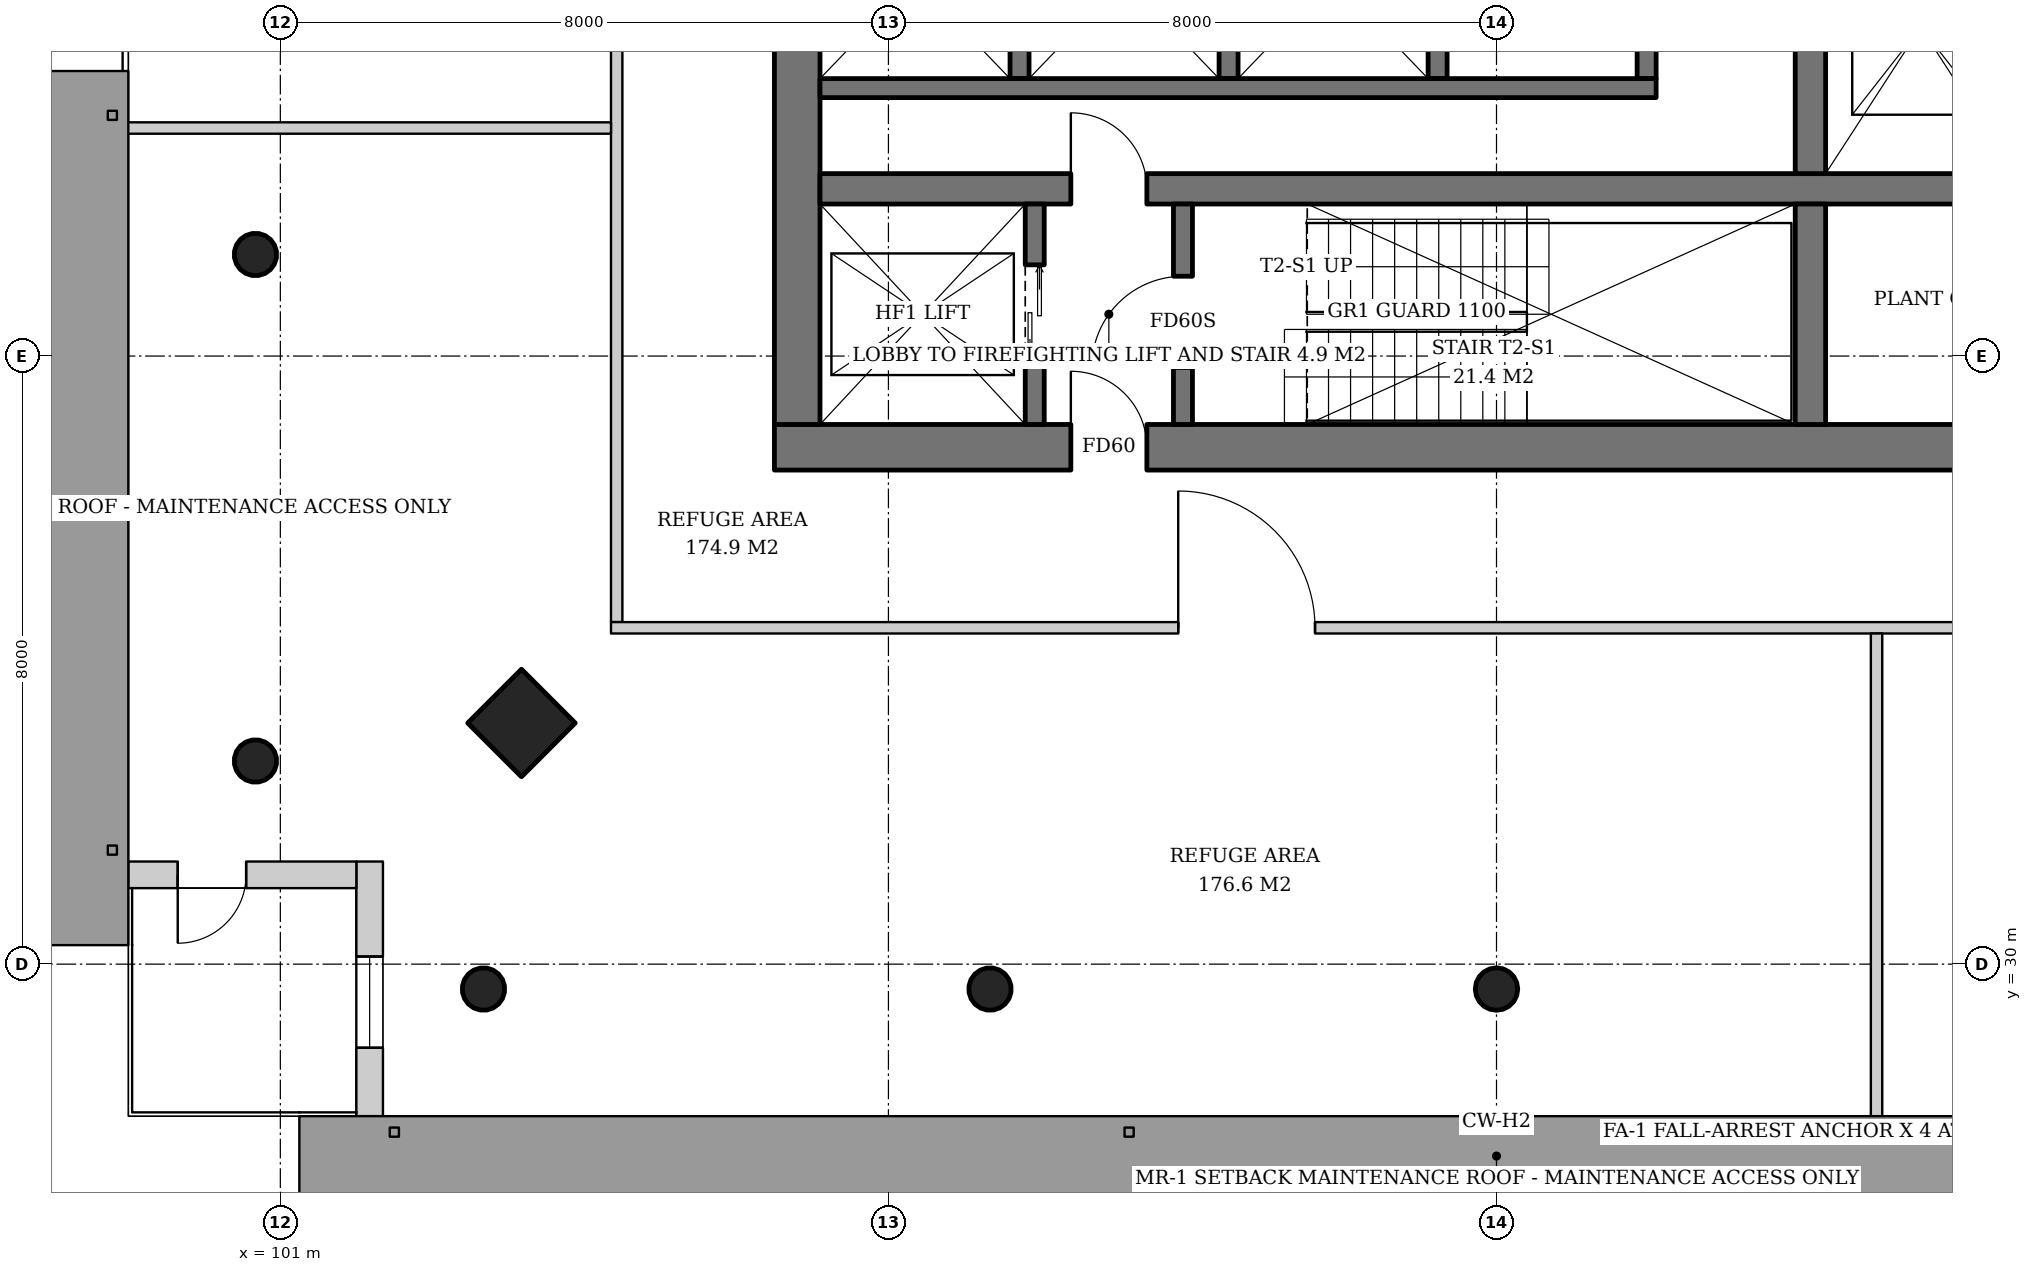
"""IFC4 building model, lengths in metres.
Left out: names, types, materials, properties, quantities, classifications, styles, units other than length and angle.
Written with IfcOpenShell. Run it as: python <this file> out.ifc"""

import sys

from ifc_helpers import new_model, si_unit, direction, frame, frame_2d, origin, origin_2d, place, context, subcontext, project, spatial, rectangle, hollow_circle, extrude, element, fill, save


model = new_model("IFC4")
c1 = context("Model", 3, precision=1e-05, world=origin(), true_north=direction((0.0, 1.0)))
c2 = subcontext(c1, "Body", "Model", "MODEL_VIEW")
j1 = project(units=[si_unit("LENGTHUNIT", "METRE"), si_unit("PLANEANGLEUNIT", "RADIAN")], contexts=[c1])
p1 = place(None, origin())
s1 = spatial("IfcSite", under=j1, at=p1, CompositionType="ELEMENT")
p2 = place(p1, origin())
s2 = spatial("IfcBuilding", under=s1, at=p2, CompositionType="ELEMENT")
p3 = place(p2, frame((0.0, 0.0, 81.8)))
s3 = spatial("IfcBuildingStorey", under=s2, at=p3, CompositionType="ELEMENT", Elevation=81.8)
p4 = place(p3, frame((104.121, 33.121, 0.0), z_axis=(0.043029647111, 0.043029647111, 0.998146732169), x_axis=(-0.707106781187, 0.707106781187, 0.0)))
e1 = element("IfcColumn", 1, at=p4, inside=s3, PredefinedType="COLUMN", context=c2, shape_type="SweptSolid", body=[
    extrude(rectangle(XDim=1.0, YDim=1.0, at=origin_2d()), origin(), (0.0, 0.0, 1.0), 3.807),
])
p5 = place(p3, frame((100.621, 32.621, 0.0), z_axis=(0.043029647111, 0.043029647111, 0.998146732169), x_axis=(-0.707106781187, 0.707106781187, 0.0)))
e2 = element("IfcColumn", 2, at=p5, inside=s3, PredefinedType="COLUMN", context=c2, shape_type="SweptSolid", body=[
    extrude(hollow_circle(Radius=0.28, WallThickness=0.02, at=origin_2d()), origin(), (0.0, 0.0, 1.0), 3.807),
])
p6 = place(p3, frame((100.621, 39.31, 0.0), z_axis=(0.043059525333, 0.021561848751, 0.998839808957), x_axis=(-0.44774654769, 0.894160516368, 0.0)))
e3 = element("IfcColumn", 3, at=p6, inside=s3, PredefinedType="COLUMN", context=c2, shape_type="SweptSolid", body=[
    extrude(hollow_circle(Radius=0.28, WallThickness=0.02, at=origin_2d()), origin(), (0.0, 0.0, 1.0), 3.804),
])
p7 = place(p3, frame((103.621, 29.621, 0.0), z_axis=(0.043029647111, 0.043029647111, 0.998146732169), x_axis=(-0.707106781187, 0.707106781187, 0.0)))
e4 = element("IfcColumn", 4, at=p7, inside=s3, PredefinedType="COLUMN", context=c2, shape_type="SweptSolid", body=[
    extrude(hollow_circle(Radius=0.28, WallThickness=0.02, at=origin_2d()), origin(), (0.0, 0.0, 1.0), 3.807),
])
p8 = place(p3, frame((110.31, 29.621, 0.0), z_axis=(0.021561848751, 0.043059525333, 0.998839808957), x_axis=(-0.894160516368, 0.44774654769, 0.0)))
e5 = element("IfcColumn", 5, at=p8, inside=s3, PredefinedType="COLUMN", context=c2, shape_type="SweptSolid", body=[
    extrude(hollow_circle(Radius=0.28, WallThickness=0.02, at=origin_2d()), origin(), (0.0, 0.0, 1.0), 3.804),
])
p9 = place(p3, frame((117.0, 29.621, 0.0), z_axis=(0.0, 0.043069538298, 0.999072076915), x_axis=(-1.0, 0.0, 0.0)))
e6 = element("IfcColumn", 6, at=p9, inside=s3, PredefinedType="COLUMN", context=c2, shape_type="SweptSolid", body=[
    extrude(hollow_circle(Radius=0.28, WallThickness=0.02, at=origin_2d()), origin(), (0.0, 0.0, 1.0), 3.803),
])
p10 = place(p3, frame((107.5, 36.8, 0.0), z_axis=(0.0, 0.0, 1.0), x_axis=(1.0, 0.0, 0.0)))
e7 = element("IfcWall", 7, at=p10, inside=s3, PredefinedType="SHEAR", context=c2, shape_type="SweptSolid", body=[
    extrude(rectangle(XDim=19.0, YDim=0.6, at=frame_2d((9.5, 0.0))), origin(), (0.0, 0.0, 1.0), 3.8),
])
p11 = place(p10, frame((3.9, 0.0, 0.0)))
e8 = element("IfcOpeningElement", 8, at=p11, cuts=e7, PredefinedType="OPENING", context=c2, shape_type="SweptSolid", body=[
    extrude(rectangle(XDim=1.0, YDim=2.1, at=frame_2d((0.5, 1.05))), frame((0.0, 0.31, 0.0), z_axis=(0.0, -1.0, 0.0), x_axis=(1.0, 0.0, 0.0)), (0.0, 0.0, 1.0), 0.62),
])
p12 = place(p10, frame((15.615, 0.0, 0.0)))
e9 = element("IfcOpeningElement", 9, at=p12, cuts=e7, PredefinedType="OPENING", context=c2, shape_type="SweptSolid", body=[
    extrude(rectangle(XDim=1.0, YDim=2.1, at=frame_2d((0.5, 1.05))), frame((0.0, 0.31, 0.0), z_axis=(0.0, -1.0, 0.0), x_axis=(1.0, 0.0, 0.0)), (0.0, 0.0, 1.0), 0.62),
])
p13 = place(p3, frame((107.8, 37.1, 0.0), z_axis=(0.0, 0.0, 1.0), x_axis=(0.0, 1.0, 0.0)))
e10 = element("IfcWall", 10, at=p13, inside=s3, PredefinedType="SHEAR", context=c2, shape_type="SweptSolid", body=[
    extrude(rectangle(XDim=17.8, YDim=0.6, at=frame_2d((8.9, 0.0))), origin(), (0.0, 0.0, 1.0), 3.8),
])
p14 = place(p13, frame((8.0, 0.0, 0.0)))
e11 = element("IfcOpeningElement", 11, at=p14, cuts=e10, PredefinedType="OPENING", context=c2, shape_type="SweptSolid", body=[
    extrude(rectangle(XDim=1.8, YDim=2.4, at=frame_2d((0.9, 1.2))), frame((0.0, 0.31, 0.0), z_axis=(0.0, -1.0, 0.0), x_axis=(1.0, 0.0, 0.0)), (0.0, 0.0, 1.0), 0.62),
])
p15 = place(p3, frame((108.1, 40.2, 0.0), z_axis=(0.0, 0.0, 1.0), x_axis=(1.0, 0.0, 0.0)))
e12 = element("IfcWall", 12, at=p15, inside=s3, PredefinedType="SHEAR", context=c2, shape_type="SweptSolid", body=[
    extrude(rectangle(XDim=17.8, YDim=0.4, at=frame_2d((8.9, 0.0))), origin(), (0.0, 0.0, 1.0), 3.8),
])
p16 = place(p15, frame((3.3, 0.0, 0.0)))
e13 = element("IfcOpeningElement", 13, at=p16, cuts=e12, PredefinedType="OPENING", context=c2, shape_type="SweptSolid", body=[
    extrude(rectangle(XDim=1.0, YDim=2.1, at=frame_2d((0.5, 1.05))), frame((0.0, 0.21, 0.0), z_axis=(0.0, -1.0, 0.0), x_axis=(1.0, 0.0, 0.0)), (0.0, 0.0, 1.0), 0.42),
])
p17 = place(p3, frame((121.13, 37.1, 0.0), z_axis=(0.0, 0.0, 1.0), x_axis=(0.0, 1.0, 0.0)))
e14 = element("IfcWall", 14, at=p17, inside=s3, PredefinedType="SHEAR", context=c2, shape_type="SweptSolid", body=[
    extrude(rectangle(XDim=2.9, YDim=0.4, at=frame_2d((1.45, 0.0))), origin(), (0.0, 0.0, 1.0), 3.8),
])
p18 = place(p3, frame((121.13, 40.4, 0.0), z_axis=(0.0, 0.0, 1.0), x_axis=(0.0, 1.0, 0.0)))
e15 = element("IfcWall", 15, at=p18, inside=s3, PredefinedType="SHEAR", context=c2, shape_type="SweptSolid", body=[
    extrude(rectangle(XDim=11.2, YDim=0.4, at=frame_2d((5.6, 0.0))), origin(), (0.0, 0.0, 1.0), 3.8),
])
p19 = place(p18, frame((5.1, 0.0, 0.0)))
e16 = element("IfcOpeningElement", 16, at=p19, cuts=e15, PredefinedType="OPENING", context=c2, shape_type="SweptSolid", body=[
    extrude(rectangle(XDim=1.0, YDim=2.1, at=frame_2d((0.5, 1.05))), frame((0.0, 0.21, 0.0), z_axis=(0.0, -1.0, 0.0), x_axis=(1.0, 0.0, 0.0)), (0.0, 0.0, 1.0), 0.42),
])
p20 = place(p3, frame((102.175, 28.0, 0.0), z_axis=(0.0, 0.0, 1.0), x_axis=(0.0, 1.0, 0.0)))
e17 = element("IfcWall", 17, at=p20, inside=s3, PredefinedType="SOLIDWALL", context=c2, shape_type="SweptSolid", body=[
    extrude(rectangle(XDim=3.35, YDim=0.35, at=frame_2d((1.675, 0.0))), origin(), (0.0, 0.0, 1.0), 3.52),
])
p21 = place(p20, frame((0.9, 0.0, 0.6)))
e18 = element("IfcOpeningElement", 18, at=p21, cuts=e17, PredefinedType="OPENING", context=c2, shape_type="SweptSolid", body=[
    extrude(rectangle(XDim=1.2, YDim=2.55, at=frame_2d((0.6, 1.275))), frame((0.0, 0.185, 0.0), z_axis=(0.0, -1.0, 0.0), x_axis=(1.0, 0.0, 0.0)), (0.0, 0.0, 1.0), 0.37),
])
p22 = place(p3, frame((102.0, 31.175, 0.0), z_axis=(0.0, 0.0, 1.0), x_axis=(-1.0, 0.0, 0.0)))
e19 = element("IfcWall", 19, at=p22, inside=s3, PredefinedType="SOLIDWALL", context=c2, shape_type="SweptSolid", body=[
    extrude(rectangle(XDim=3.0, YDim=0.35, at=frame_2d((1.5, 0.0))), origin(), (0.0, 0.0, 1.0), 3.52),
])
p23 = place(p22, frame((1.45, 0.0, 0.0)))
e20 = element("IfcOpeningElement", 20, at=p23, cuts=e19, PredefinedType="OPENING", context=c2, shape_type="SweptSolid", body=[
    extrude(rectangle(XDim=0.9, YDim=2.1, at=frame_2d((0.45, 1.05))), frame((0.0, 0.185, 0.0), z_axis=(0.0, -1.0, 0.0), x_axis=(1.0, 0.0, 0.0)), (0.0, 0.0, 1.0), 0.37),
])
p24 = place(p3, frame((110.925, 37.1, 0.0), z_axis=(0.0, 0.0, 1.0), x_axis=(0.0, 1.0, 0.0)))
e21 = element("IfcWall", 21, at=p24, inside=s3, PredefinedType="SHEAR", context=c2, shape_type="SweptSolid", body=[
    extrude(rectangle(XDim=2.9, YDim=0.25, at=frame_2d((1.45, 0.0))), origin(), (0.0, 0.0, 1.0), 3.8),
])
p25 = place(p24, frame((0.8, 0.0, 0.0)))
e22 = element("IfcOpeningElement", 22, at=p25, cuts=e21, PredefinedType="OPENING", context=c2, shape_type="SweptSolid", body=[
    extrude(rectangle(XDim=1.3, YDim=2.2, at=frame_2d((0.65, 1.1))), frame((0.0, 0.135, 0.0), z_axis=(0.0, -1.0, 0.0), x_axis=(1.0, 0.0, 0.0)), (0.0, 0.0, 1.0), 0.27),
])
p26 = place(p3, frame((112.875, 37.1, 0.0), z_axis=(0.0, 0.0, 1.0), x_axis=(0.0, 1.0, 0.0)))
e23 = element("IfcWall", 23, at=p26, inside=s3, PredefinedType="SHEAR", context=c2, shape_type="SweptSolid", body=[
    extrude(rectangle(XDim=2.9, YDim=0.25, at=frame_2d((1.45, 0.0))), origin(), (0.0, 0.0, 1.0), 3.8),
])
p27 = place(p26, frame((0.75, 0.0, 0.0)))
e24 = element("IfcOpeningElement", 24, at=p27, cuts=e23, PredefinedType="OPENING", context=c2, shape_type="SweptSolid", body=[
    extrude(rectangle(XDim=1.2, YDim=2.1, at=frame_2d((0.6, 1.05))), frame((0.0, 0.135, 0.0), z_axis=(0.0, -1.0, 0.0), x_axis=(1.0, 0.0, 0.0)), (0.0, 0.0, 1.0), 0.27),
])
for number, where, z_axis, x_axis in (
    (25, (110.725, 44.25, 0.0), (0.0, 0.0, 1.0), (0.0, -1.0, 0.0)),
    (26, (113.475, 44.25, 0.0), (0.0, 0.0, 1.0), (0.0, -1.0, 0.0)),
    (27, (116.225, 44.25, 0.0), (0.0, 0.0, 1.0), (0.0, -1.0, 0.0)),
    (28, (118.975, 44.25, 0.0), (0.0, 0.0, 1.0), (0.0, -1.0, 0.0)),
):
    element("IfcWall", number, at=place(p3, frame(where, z_axis=z_axis, x_axis=x_axis)), inside=s3, PredefinedType="SHEAR", context=c2, shape_type="SweptSolid", body=[
        extrude(rectangle(XDim=2.6, YDim=0.25, at=frame_2d((1.3, 0.0))), origin(), (0.0, 0.0, 1.0), 3.8),
    ])
p28 = place(p3, frame((108.1, 41.525, 0.0), z_axis=(0.0, 0.0, 1.0), x_axis=(1.0, 0.0, 0.0)))
e29 = element("IfcWall", 29, at=p28, inside=s3, PredefinedType="SHEAR", context=c2, shape_type="SweptSolid", body=[
    extrude(rectangle(XDim=11.0, YDim=0.25, at=frame_2d((5.5, 0.0))), origin(), (0.0, 0.0, 1.0), 3.8),
])
p29 = place(p3, frame((105.425, 57.65, 0.0), z_axis=(0.0, 0.0, 1.0), x_axis=(0.0, -1.0, 0.0)))
e30 = element("IfcWall", 30, at=p29, inside=s3, PredefinedType="PARTITIONING", context=c2, shape_type="SweptSolid", body=[
    extrude(rectangle(XDim=23.15, YDim=0.15, at=frame_2d((11.575, 0.0))), origin(), (0.0, 0.0, 1.0), 2.82),
])
p30 = place(p29, frame((7.462, 0.0, 0.0)))
e31 = element("IfcOpeningElement", 31, at=p30, cuts=e30, PredefinedType="OPENING", context=c2, shape_type="SweptSolid", body=[
    extrude(rectangle(XDim=1.8, YDim=2.4, at=frame_2d((0.9, 1.2))), frame((0.0, 0.085, 0.0), z_axis=(0.0, -1.0, 0.0), x_axis=(1.0, 0.0, 0.0)), (0.0, 0.0, 1.0), 0.17),
])
p31 = place(p3, frame((105.35, 41.0, 0.0), z_axis=(0.0, 0.0, 1.0), x_axis=(-1.0, 0.0, 0.0)))
e32 = element("IfcWall", 32, at=p31, inside=s3, PredefinedType="PARTITIONING", context=c2, shape_type="SweptSolid", body=[
    extrude(rectangle(XDim=6.39, YDim=0.15, at=frame_2d((3.195, 0.0))), origin(), (0.0, 0.0, 1.0), 3.12),
])
p32 = place(p3, frame((105.35, 34.425, 0.0), z_axis=(0.0, 0.0, 1.0), x_axis=(1.0, 0.0, 0.0)))
e33 = element("IfcWall", 33, at=p32, inside=s3, PredefinedType="PARTITIONING", context=c2, shape_type="SweptSolid", body=[
    extrude(rectangle(XDim=23.15, YDim=0.15, at=frame_2d((11.575, 0.0))), origin(), (0.0, 0.0, 1.0), 2.82),
])
p33 = place(p32, frame((7.462, 0.0, 0.0)))
e34 = element("IfcOpeningElement", 34, at=p33, cuts=e33, PredefinedType="OPENING", context=c2, shape_type="SweptSolid", body=[
    extrude(rectangle(XDim=1.8, YDim=2.4, at=frame_2d((0.9, 1.2))), frame((0.0, 0.085, 0.0), z_axis=(0.0, -1.0, 0.0), x_axis=(1.0, 0.0, 0.0)), (0.0, 0.0, 1.0), 0.17),
])
p34 = place(p3, frame((122.0, 34.35, 0.0), z_axis=(0.0, 0.0, 1.0), x_axis=(0.0, -1.0, 0.0)))
e35 = element("IfcWall", 35, at=p34, inside=s3, PredefinedType="PARTITIONING", context=c2, shape_type="SweptSolid", body=[
    extrude(rectangle(XDim=6.39, YDim=0.15, at=frame_2d((3.195, 0.0))), origin(), (0.0, 0.0, 1.0), 3.12),
])
p35 = place(p21, origin())
e36 = element("IfcWindow", 36, at=p35, inside=s3, PartitioningType="SINGLE_PANEL", PredefinedType="USERDEFINED", context=c2, shape_type="SweptSolid", body=[
    extrude(rectangle(XDim=1.2, YDim=2.55, at=frame_2d((0.6, 1.275))), frame((0.0, 0.03, 0.0), z_axis=(0.0, -1.0, 0.0), x_axis=(1.0, 0.0, 0.0)), (0.0, 0.0, 1.0), 0.06),
])
fill(e18, e36)
p36 = place(p23, origin())
e37 = element("IfcDoor", 37, at=p36, inside=s3, OperationType="SINGLE_SWING_RIGHT", PredefinedType="DOOR", context=c2, shape_type="SweptSolid", body=[
    extrude(rectangle(XDim=0.9, YDim=2.1, at=frame_2d((0.45, 1.05))), frame((0.0, 0.025, 0.0), z_axis=(0.0, -1.0, 0.0), x_axis=(1.0, 0.0, 0.0)), (0.0, 0.0, 1.0), 0.05),
])
fill(e20, e37)
p37 = place(p25, origin())
e38 = element("IfcDoor", 38, at=p37, inside=s3, OperationType="DOUBLE_DOOR_SLIDING", PredefinedType="DOOR", context=c2, shape_type="SweptSolid", body=[
    extrude(rectangle(XDim=1.3, YDim=2.2, at=frame_2d((0.65, 1.1))), frame((0.0, 0.025, 0.0), z_axis=(0.0, -1.0, 0.0), x_axis=(1.0, 0.0, 0.0)), (0.0, 0.0, 1.0), 0.05),
])
fill(e22, e38)
p38 = place(p27, origin())
e39 = element("IfcDoor", 39, at=p38, inside=s3, OperationType="SINGLE_SWING_LEFT", PredefinedType="DOOR", context=c2, shape_type="SweptSolid", body=[
    extrude(rectangle(XDim=1.2, YDim=2.1, at=frame_2d((0.6, 1.05))), frame((0.0, 0.025, 0.0), z_axis=(0.0, -1.0, 0.0), x_axis=(1.0, 0.0, 0.0)), (0.0, 0.0, 1.0), 0.05),
])
fill(e24, e39)
p39 = place(p11, origin())
e40 = element("IfcDoor", 40, at=p39, inside=s3, OperationType="SINGLE_SWING_LEFT", PredefinedType="DOOR", context=c2, shape_type="SweptSolid", body=[
    extrude(rectangle(XDim=1.0, YDim=2.1, at=frame_2d((0.5, 1.05))), frame((0.0, 0.025, 0.0), z_axis=(0.0, -1.0, 0.0), x_axis=(1.0, 0.0, 0.0)), (0.0, 0.0, 1.0), 0.05),
])
fill(e8, e40)
p40 = place(p16, origin())
e41 = element("IfcDoor", 41, at=p40, inside=s3, OperationType="SINGLE_SWING_LEFT", PredefinedType="DOOR", context=c2, shape_type="SweptSolid", body=[
    extrude(rectangle(XDim=1.0, YDim=2.1, at=frame_2d((0.5, 1.05))), frame((0.0, 0.025, 0.0), z_axis=(0.0, -1.0, 0.0), x_axis=(1.0, 0.0, 0.0)), (0.0, 0.0, 1.0), 0.05),
])
fill(e13, e41)
p41 = place(p33, origin())
e42 = element("IfcDoor", 42, at=p41, inside=s3, OperationType="DOUBLE_DOOR_SINGLE_SWING", PredefinedType="DOOR", context=c2, shape_type="SweptSolid", body=[
    extrude(rectangle(XDim=1.8, YDim=2.4, at=frame_2d((0.9, 1.2))), frame((0.0, 0.025, 0.0), z_axis=(0.0, -1.0, 0.0), x_axis=(1.0, 0.0, 0.0)), (0.0, 0.0, 1.0), 0.05),
])
fill(e34, e42)
save(model, sys.argv[1])
